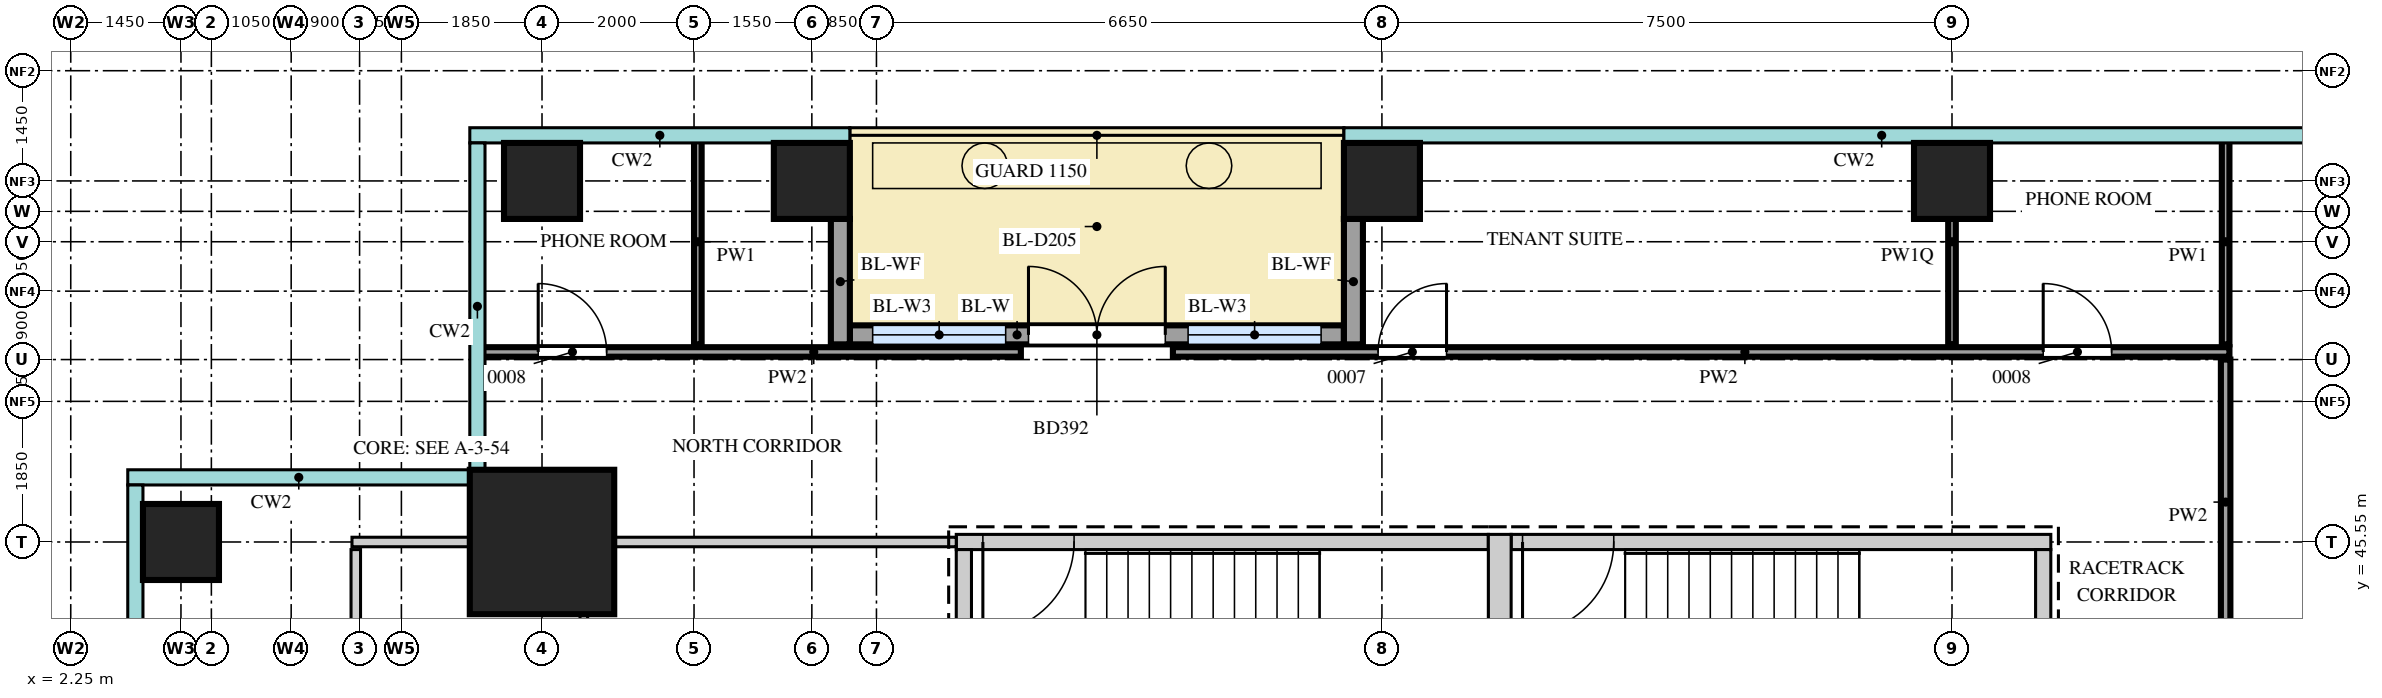
"""IFC4 building model, lengths in metres.
Left out: names, types, materials, properties, quantities, classifications, styles, units other than length and angle.
Written with IfcOpenShell. Run it as: python <this file> out.ifc"""

import sys

from ifc_helpers import new_model, si_unit, direction, frame, frame_2d, origin, origin_2d, place, context, subcontext, project, spatial, rectangle, extrude, source, transform, mapped, element, fill, save


model = new_model("IFC4")
c1 = context("Model", 3, precision=1e-05, world=origin(), true_north=direction((0.0, 1.0)))
c2 = subcontext(c1, "Body", "Model", "MODEL_VIEW")
j1 = project(units=[si_unit("LENGTHUNIT", "METRE"), si_unit("PLANEANGLEUNIT", "RADIAN")], contexts=[c1])
p1 = place(None, origin())
s1 = spatial("IfcSite", under=j1, at=p1, CompositionType="ELEMENT")
p2 = place(p1, origin())
s2 = spatial("IfcBuilding", under=s1, at=p2, CompositionType="ELEMENT")
p3 = place(p2, frame((0.0, 0.0, 180.7)))
s3 = spatial("IfcBuildingStorey", under=s2, at=p3, CompositionType="ELEMENT", Elevation=180.7)
m1 = source(origin(), c2, "Body", "SweptSolid", [
    extrude(rectangle(XDim=7.0, YDim=0.2, at=frame_2d((3.5, 0.0))), origin(), (0.0, 0.0, 1.0), 3.75),
])
p4 = place(p3, frame((13.9, 45.55, 0.0), z_axis=(0.0, 0.0, 1.0), x_axis=(1.0, 0.0, 0.0)))
e1 = element("IfcWall", 1, at=p4, inside=s3, PredefinedType="SHEAR", context=c2, shape_type="MappedRepresentation", body=[
    mapped(m1, transform((0.0, 0.0, 0.0))),
])
m2 = source(origin(), c2, "Body", "SweptSolid", [
    extrude(rectangle(XDim=1.2, YDim=2.1, at=frame_2d((0.6, 1.05))), frame((0.0, 0.11, 0.0), z_axis=(0.0, -1.0, 0.0), x_axis=(1.0, 0.0, 0.0)), (0.0, 0.0, 1.0), 0.22),
])
p5 = place(p4, frame((0.35, 0.0, 0.0)))
e2 = element("IfcOpeningElement", 2, at=p5, cuts=e1, PredefinedType="OPENING", context=c2, shape_type="MappedRepresentation", body=[
    mapped(m2, transform((0.0, 0.0, 0.0))),
])
m3 = source(origin(), c2, "Body", "SweptSolid", [
    extrude(rectangle(XDim=7.1, YDim=0.2, at=frame_2d((3.55, 0.0))), origin(), (0.0, 0.0, 1.0), 3.75),
])
p6 = place(p3, frame((21.2, 45.55, 0.0), z_axis=(0.0, 0.0, 1.0), x_axis=(1.0, 0.0, 0.0)))
e3 = element("IfcWall", 3, at=p6, inside=s3, PredefinedType="SHEAR", context=c2, shape_type="MappedRepresentation", body=[
    mapped(m3, transform((0.0, 0.0, 0.0))),
])
p7 = place(p6, frame((0.15, 0.0, 0.0)))
e4 = element("IfcOpeningElement", 4, at=p7, cuts=e3, PredefinedType="OPENING", context=c2, shape_type="MappedRepresentation", body=[
    mapped(m2, transform((0.0, 0.0, 0.0))),
])
m4 = source(origin(), c2, "Body", "SweptSolid", [
    extrude(rectangle(XDim=3.75, YDim=0.3, at=frame_2d((1.875, 0.0))), origin(), (0.0, 0.0, 1.0), 3.75),
])
p8 = place(p3, frame((21.05, 41.9, 0.0), z_axis=(0.0, 0.0, 1.0), x_axis=(0.0, 1.0, 0.0)))
e5 = element("IfcWall", 5, at=p8, inside=s3, PredefinedType="SHEAR", context=c2, shape_type="MappedRepresentation", body=[
    mapped(m4, transform((0.0, 0.0, 0.0))),
])
m5 = source(origin(), c2, "Body", "SweptSolid", [
    extrude(rectangle(XDim=3.35, YDim=0.2, at=frame_2d((1.675, 0.0))), origin(), (0.0, 0.0, 1.0), 3.75),
])
for number, where, z_axis, x_axis in (
    (6, (14.0, 42.1, 0.0), (0.0, 0.0, 1.0), (0.0, 1.0, 0.0)),
    (7, (28.2, 42.1, 0.0), (0.0, 0.0, 1.0), (0.0, 1.0, 0.0)),
):
    element("IfcWall", number, at=place(p3, frame(where, z_axis=z_axis, x_axis=x_axis)), inside=s3, PredefinedType="SHEAR", context=c2, shape_type="MappedRepresentation", body=[
        mapped(m5, transform((0.0, 0.0, 0.0))),
    ])
m6 = source(origin(), c2, "Body", "SweptSolid", [
    extrude(rectangle(XDim=1.9, YDim=1.9, at=origin_2d()), origin(), (0.0, 0.0, 1.0), 4.0),
])
p9 = place(p3, frame((8.45, 45.55, 0.0), z_axis=(0.0, 0.0, 1.0), x_axis=(1.0, 0.0, 0.0)))
e8 = element("IfcColumn", 8, at=p9, inside=s3, PredefinedType="COLUMN", context=c2, shape_type="MappedRepresentation", body=[
    mapped(m6, transform((0.0, 0.0, 0.0))),
])
m7 = source(origin(), c2, "Body", "SweptSolid", [
    extrude(rectangle(XDim=1.0, YDim=1.0, at=origin_2d()), origin(), (0.0, 0.0, 1.0), 3.75),
])
for number, where, z_axis, x_axis in (
    (9, (8.45, 50.3, 0.0), (0.0, 0.0, 1.0), (1.0, 0.0, 0.0)),
    (10, (12.0, 50.3, 0.0), (0.0, 0.0, 1.0), (1.0, 0.0, 0.0)),
    (11, (19.5, 50.3, 0.0), (0.0, 0.0, 1.0), (1.0, 0.0, 0.0)),
    (12, (27.0, 50.3, 0.0), (0.0, 0.0, 1.0), (1.0, 0.0, 0.0)),
    (13, (3.7, 45.55, 0.0), (0.0, 0.0, 1.0), (1.0, 0.0, 0.0)),
):
    element("IfcColumn", number, at=place(p3, frame(where, z_axis=z_axis, x_axis=x_axis)), inside=s3, PredefinedType="COLUMN", context=c2, shape_type="MappedRepresentation", body=[
        mapped(m7, transform((0.0, 0.0, 0.0))),
    ])
m8 = source(origin(), c2, "Body", "SweptSolid", [
    extrude(rectangle(XDim=6.5, YDim=0.25, at=frame_2d((3.25, 0.0))), origin(), (0.0, 0.0, 1.0), 3.75),
])
p10 = place(p3, frame((12.5, 48.275, 0.0), z_axis=(0.0, 0.0, 1.0), x_axis=(1.0, 0.0, 0.0)))
e14 = element("IfcWall", 14, at=p10, inside=s3, PredefinedType="SOLIDWALL", context=c2, shape_type="MappedRepresentation", body=[
    mapped(m8, transform((0.0, 0.0, 0.0))),
])
m9 = source(origin(), c2, "Body", "SweptSolid", [
    extrude(rectangle(XDim=1.75, YDim=2.4, at=frame_2d((0.875, 1.2))), frame((0.0, 0.135, 0.0), z_axis=(0.0, -1.0, 0.0), x_axis=(1.0, 0.0, 0.0)), (0.0, 0.0, 1.0), 0.27),
])
p11 = place(p10, frame((0.3, 0.0, 0.0)))
e15 = element("IfcOpeningElement", 15, at=p11, cuts=e14, PredefinedType="OPENING", context=c2, shape_type="MappedRepresentation", body=[
    mapped(m9, transform((0.0, 0.0, 0.0))),
])
p12 = place(p10, frame((4.45, 0.0, 0.0)))
e16 = element("IfcOpeningElement", 16, at=p12, cuts=e14, PredefinedType="OPENING", context=c2, shape_type="MappedRepresentation", body=[
    mapped(m9, transform((0.0, 0.0, 0.0))),
])
m10 = source(origin(), c2, "Body", "SweptSolid", [
    extrude(rectangle(XDim=1.8, YDim=2.4, at=frame_2d((0.9, 1.2))), frame((0.0, 0.135, 0.0), z_axis=(0.0, -1.0, 0.0), x_axis=(1.0, 0.0, 0.0)), (0.0, 0.0, 1.0), 0.27),
])
p13 = place(p10, frame((2.35, 0.0, 0.0)))
e17 = element("IfcOpeningElement", 17, at=p13, cuts=e14, PredefinedType="OPENING", context=c2, shape_type="MappedRepresentation", body=[
    mapped(m10, transform((0.0, 0.0, 0.0))),
])
m11 = source(origin(), c2, "Body", "SweptSolid", [
    extrude(rectangle(XDim=1.65, YDim=0.25, at=frame_2d((0.825, 0.0))), origin(), (0.0, 0.0, 1.0), 3.45),
])
for number, where, z_axis, x_axis in (
    (18, (12.375, 49.8, 0.0), (0.0, 0.0, 1.0), (0.0, -1.0, 0.0)),
    (19, (19.125, 49.8, 0.0), (0.0, 0.0, 1.0), (0.0, -1.0, 0.0)),
):
    element("IfcWall", number, at=place(p3, frame(where, z_axis=z_axis, x_axis=x_axis)), inside=s3, PredefinedType="SOLIDWALL", context=c2, shape_type="MappedRepresentation", body=[
        mapped(m11, transform((0.0, 0.0, 0.0))),
    ])
m12 = source(origin(), c2, "Body", "SweptSolid", [
    extrude(rectangle(XDim=8.35, YDim=0.125, at=frame_2d((4.175, 0.0))), origin(), (0.0, 0.0, 1.0), 3.8),
])
p14 = place(p3, frame((30.6, 39.6, 0.0), z_axis=(0.0, 0.0, 1.0), x_axis=(0.0, 1.0, 0.0)))
e20 = element("IfcWall", 20, at=p14, inside=s3, PredefinedType="PARTITIONING", context=c2, shape_type="MappedRepresentation", body=[
    mapped(m12, transform((0.0, 0.0, 0.0))),
])
m13 = source(origin(), c2, "Body", "SweptSolid", [
    extrude(rectangle(XDim=0.9, YDim=2.1, at=frame_2d((0.45, 1.05))), frame((0.0, 0.073, 0.0), z_axis=(0.0, -1.0, 0.0), x_axis=(1.0, 0.0, 0.0)), (0.0, 0.0, 1.0), 0.145),
])
p15 = place(p14, frame((3.7, 0.0, 0.0)))
e21 = element("IfcOpeningElement", 21, at=p15, cuts=e20, PredefinedType="OPENING", context=c2, shape_type="MappedRepresentation", body=[
    mapped(m13, transform((0.0, 0.0, 0.0))),
])
m14 = source(origin(), c2, "Body", "SweptSolid", [
    extrude(rectangle(XDim=3.45, YDim=0.125, at=frame_2d((1.725, 0.0))), origin(), (0.0, 0.0, 1.0), 3.8),
])
p16 = place(p3, frame((6.0, 42.0, 0.0), z_axis=(0.0, 0.0, 1.0), x_axis=(0.0, 1.0, 0.0)))
e22 = element("IfcWall", 22, at=p16, inside=s3, PredefinedType="PARTITIONING", context=c2, shape_type="MappedRepresentation", body=[
    mapped(m14, transform((0.0, 0.0, 0.0))),
])
p17 = place(p16, frame((1.15, 0.0, 0.0)))
e23 = element("IfcOpeningElement", 23, at=p17, cuts=e22, PredefinedType="OPENING", context=c2, shape_type="MappedRepresentation", body=[
    mapped(m13, transform((0.0, 0.0, 0.0))),
])
m15 = source(origin(), c2, "Body", "SweptSolid", [
    extrude(rectangle(XDim=3.45, YDim=0.1, at=frame_2d((1.725, 0.0))), origin(), (0.0, 0.0, 1.0), 3.8),
])
p18 = place(p3, frame((9.0, 42.0, 0.0), z_axis=(0.0, 0.0, 1.0), x_axis=(0.0, 1.0, 0.0)))
e24 = element("IfcWall", 24, at=p18, inside=s3, PredefinedType="PARTITIONING", context=c2, shape_type="MappedRepresentation", body=[
    mapped(m15, transform((0.0, 0.0, 0.0))),
])
m16 = source(origin(), c2, "Body", "SweptSolid", [
    extrude(rectangle(XDim=7.95, YDim=0.125, at=frame_2d((3.975, 0.0))), origin(), (0.0, 0.0, 1.0), 3.25),
])
p19 = place(p3, frame((5.95, 45.55, 0.0), z_axis=(0.0, 0.0, 1.0), x_axis=(1.0, 0.0, 0.0)))
e25 = element("IfcWall", 25, at=p19, inside=s3, PredefinedType="PARTITIONING", context=c2, shape_type="MappedRepresentation", body=[
    mapped(m16, transform((0.0, 0.0, 0.0))),
])
m17 = source(origin(), c2, "Body", "SweptSolid", [
    extrude(rectangle(XDim=2.7, YDim=0.1, at=frame_2d((1.35, 0.0))), origin(), (0.0, 0.0, 1.0), 3.8),
])
p20 = place(p3, frame((10.5, 48.15, 0.0), z_axis=(0.0, 0.0, 1.0), x_axis=(0.0, 1.0, 0.0)))
e26 = element("IfcWall", 26, at=p20, inside=s3, PredefinedType="PARTITIONING", context=c2, shape_type="MappedRepresentation", body=[
    mapped(m17, transform((0.0, 0.0, 0.0))),
])
m18 = source(origin(), c2, "Body", "SweptSolid", [
    extrude(rectangle(XDim=2.7, YDim=0.1, at=frame_2d((1.35, 0.0))), origin(), (0.0, 0.0, 1.0), 3.42),
])
p21 = place(p3, frame((27.0, 48.15, 0.0), z_axis=(0.0, 0.0, 1.0), x_axis=(0.0, 1.0, 0.0)))
e27 = element("IfcWall", 27, at=p21, inside=s3, PredefinedType="PARTITIONING", context=c2, shape_type="MappedRepresentation", body=[
    mapped(m18, transform((0.0, 0.0, 0.0))),
])
p22 = place(p3, frame((30.6, 48.15, 0.0), z_axis=(0.0, 0.0, 1.0), x_axis=(0.0, 1.0, 0.0)))
e28 = element("IfcWall", 28, at=p22, inside=s3, PredefinedType="PARTITIONING", context=c2, shape_type="MappedRepresentation", body=[
    mapped(m17, transform((0.0, 0.0, 0.0))),
])
m19 = source(origin(), c2, "Body", "SweptSolid", [
    extrude(rectangle(XDim=7.1, YDim=0.125, at=frame_2d((3.55, 0.0))), origin(), (0.0, 0.0, 1.0), 3.8),
])
p23 = place(p3, frame((7.65, 48.05, 0.0), z_axis=(0.0, 0.0, 1.0), x_axis=(1.0, 0.0, 0.0)))
e29 = element("IfcWall", 29, at=p23, inside=s3, PredefinedType="PARTITIONING", context=c2, shape_type="MappedRepresentation", body=[
    mapped(m19, transform((0.0, 0.0, 0.0))),
])
p24 = place(p23, frame((0.75, 0.0, 0.0)))
e30 = element("IfcOpeningElement", 30, at=p24, cuts=e29, PredefinedType="OPENING", context=c2, shape_type="MappedRepresentation", body=[
    mapped(m13, transform((0.0, 0.0, 0.0))),
])
m20 = source(origin(), c2, "Body", "SweptSolid", [
    extrude(rectangle(XDim=13.9, YDim=0.125, at=frame_2d((6.95, 0.0))), origin(), (0.0, 0.0, 1.0), 3.8),
])
p25 = place(p3, frame((16.75, 48.05, 0.0), z_axis=(0.0, 0.0, 1.0), x_axis=(1.0, 0.0, 0.0)))
e31 = element("IfcWall", 31, at=p25, inside=s3, PredefinedType="PARTITIONING", context=c2, shape_type="MappedRepresentation", body=[
    mapped(m20, transform((0.0, 0.0, 0.0))),
])
p26 = place(p25, frame((2.7, 0.0, 0.0)))
e32 = element("IfcOpeningElement", 32, at=p26, cuts=e31, PredefinedType="OPENING", context=c2, shape_type="MappedRepresentation", body=[
    mapped(m13, transform((0.0, 0.0, 0.0))),
])
p27 = place(p25, frame((11.45, 0.0, 0.0)))
e33 = element("IfcOpeningElement", 33, at=p27, cuts=e31, PredefinedType="OPENING", context=c2, shape_type="MappedRepresentation", body=[
    mapped(m13, transform((0.0, 0.0, 0.0))),
])
m21 = source(origin(), c2, "Body", "SweptSolid", [
    extrude(rectangle(XDim=1.75, YDim=2.4, at=frame_2d((0.875, 1.2))), frame((0.0, 0.03, 0.0), z_axis=(0.0, -1.0, 0.0), x_axis=(1.0, 0.0, 0.0)), (0.0, 0.0, 1.0), 0.06),
])
p28 = place(p11, origin())
e34 = element("IfcWindow", 34, at=p28, inside=s3, PartitioningType="SINGLE_PANEL", PredefinedType="WINDOW", context=c2, shape_type="MappedRepresentation", body=[
    mapped(m21, transform((0.0, 0.0, 0.0))),
])
fill(e15, e34)
p29 = place(p12, origin())
e35 = element("IfcWindow", 35, at=p29, inside=s3, PartitioningType="SINGLE_PANEL", PredefinedType="WINDOW", context=c2, shape_type="MappedRepresentation", body=[
    mapped(m21, transform((0.0, 0.0, 0.0))),
])
fill(e16, e35)
m22 = source(origin(), c2, "Body", "SweptSolid", [
    extrude(rectangle(XDim=1.8, YDim=2.4, at=frame_2d((0.9, 1.2))), frame((0.0, 0.025, 0.0), z_axis=(0.0, -1.0, 0.0), x_axis=(1.0, 0.0, 0.0)), (0.0, 0.0, 1.0), 0.05),
])
p30 = place(p13, origin())
e36 = element("IfcDoor", 36, at=p30, inside=s3, OperationType="DOUBLE_DOOR_DOUBLE_SWING", PredefinedType="DOOR", context=c2, shape_type="MappedRepresentation", body=[
    mapped(m22, transform((0.0, 0.0, 0.0))),
])
fill(e17, e36)
m23 = source(origin(), c2, "Body", "SweptSolid", [
    extrude(rectangle(XDim=0.9, YDim=2.1, at=frame_2d((0.45, 1.05))), frame((0.0, 0.025, 0.0), z_axis=(0.0, -1.0, 0.0), x_axis=(1.0, 0.0, 0.0)), (0.0, 0.0, 1.0), 0.05),
])
p31 = place(p24, origin())
e37 = element("IfcDoor", 37, at=p31, inside=s3, OperationType="SINGLE_SWING_RIGHT", PredefinedType="DOOR", context=c2, shape_type="MappedRepresentation", body=[
    mapped(m23, transform((0.0, 0.0, 0.0))),
])
fill(e30, e37)
p32 = place(p26, origin())
e38 = element("IfcDoor", 38, at=p32, inside=s3, OperationType="SINGLE_SWING_LEFT", PredefinedType="DOOR", context=c2, shape_type="MappedRepresentation", body=[
    mapped(m23, transform((0.0, 0.0, 0.0))),
])
fill(e32, e38)
p33 = place(p27, origin())
e39 = element("IfcDoor", 39, at=p33, inside=s3, OperationType="SINGLE_SWING_RIGHT", PredefinedType="DOOR", context=c2, shape_type="MappedRepresentation", body=[
    mapped(m23, transform((0.0, 0.0, 0.0))),
])
fill(e33, e39)
m24 = source(origin(), c2, "Body", "SweptSolid", [
    extrude(rectangle(XDim=1.2, YDim=2.1, at=frame_2d((0.6, 1.05))), frame((0.0, 0.025, 0.0), z_axis=(0.0, -1.0, 0.0), x_axis=(1.0, 0.0, 0.0)), (0.0, 0.0, 1.0), 0.05),
])
p34 = place(p5, origin())
e40 = element("IfcDoor", 40, at=p34, inside=s3, OperationType="SINGLE_SWING_LEFT", PredefinedType="DOOR", context=c2, shape_type="MappedRepresentation", body=[
    mapped(m24, transform((0.0, 0.0, 0.0))),
])
fill(e2, e40)
p35 = place(p7, origin())
e41 = element("IfcDoor", 41, at=p35, inside=s3, OperationType="SINGLE_SWING_LEFT", PredefinedType="DOOR", context=c2, shape_type="MappedRepresentation", body=[
    mapped(m24, transform((0.0, 0.0, 0.0))),
])
fill(e4, e41)
save(model, sys.argv[1])
